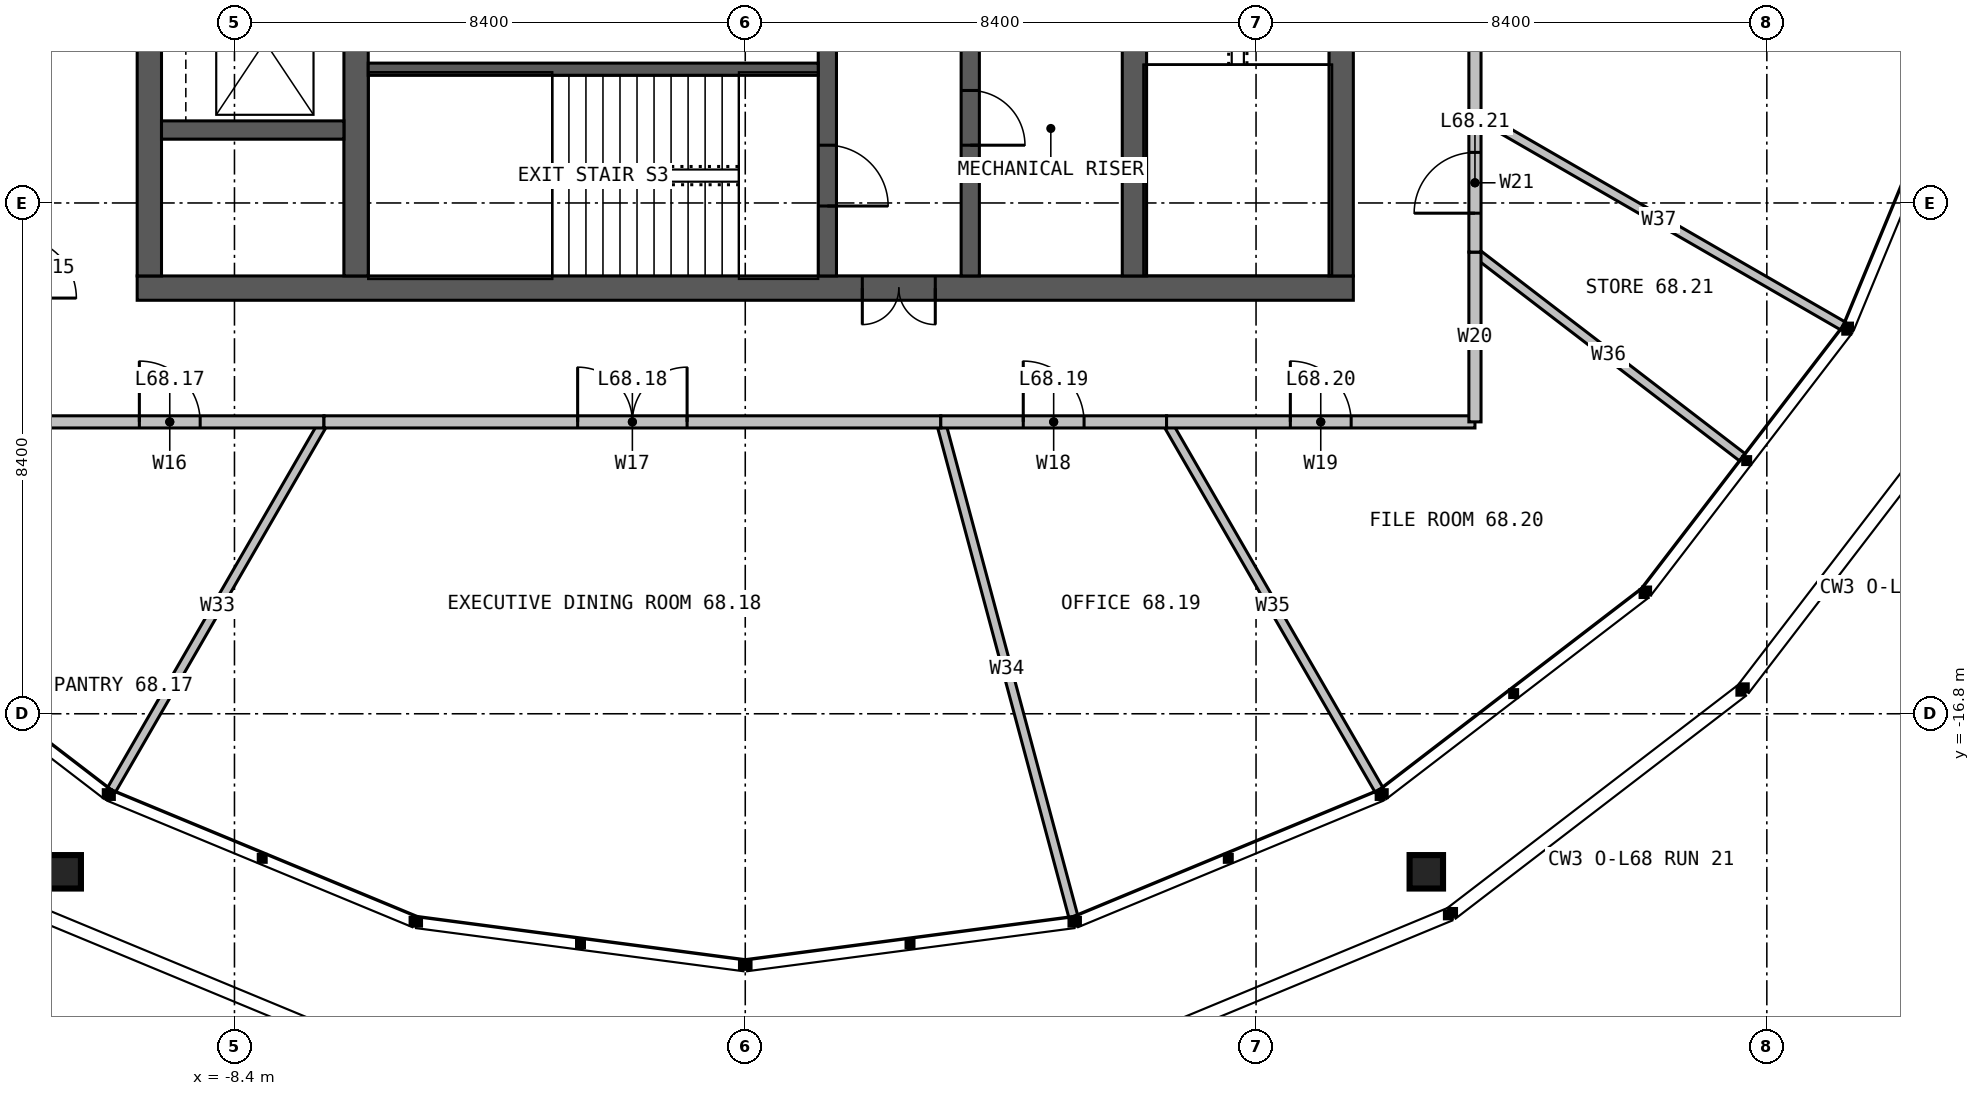
"""IFC4 building model, lengths in metres.
Left out: names, types, materials, properties, quantities, classifications, styles, units other than length and angle.
Written with IfcOpenShell. Run it as: python <this file> out.ifc"""

import sys

from ifc_helpers import new_model, si_unit, direction, frame, frame_2d, origin, origin_2d, place, context, subcontext, project, spatial, rectangle, hollow_rectangle, extrude, element, fill, save


model = new_model("IFC4")
c1 = context("Model", 3, precision=1e-05, world=origin(), true_north=direction((0.0, 1.0)))
c2 = subcontext(c1, "Body", "Model", "MODEL_VIEW")
j1 = project(units=[si_unit("LENGTHUNIT", "METRE"), si_unit("PLANEANGLEUNIT", "RADIAN")], contexts=[c1])
p1 = place(None, origin())
s1 = spatial("IfcSite", under=j1, at=p1, CompositionType="ELEMENT")
p2 = place(p1, origin())
s2 = spatial("IfcBuilding", under=s1, at=p2, CompositionType="ELEMENT")
p3 = place(p2, frame((0.0, 0.0, 280.0)))
s3 = spatial("IfcBuildingStorey", under=s2, at=p3, CompositionType="ELEMENT", Elevation=280.0)
p4 = place(p3, frame((10.0, -9.8, 0.0), z_axis=(0.0, 0.0, 1.0), x_axis=(-1.0, 0.0, 0.0)))
e1 = element("IfcWall", 1, at=p4, inside=s3, PredefinedType="SOLIDWALL", context=c2, shape_type="SweptSolid", body=[
    extrude(rectangle(XDim=20.0, YDim=0.4, at=frame_2d((10.0, 0.0))), origin(), (0.0, 0.0, 1.0), 4.0),
])
p5 = place(p4, frame((6.875, 0.0, 0.0)))
e2 = element("IfcOpeningElement", 2, at=p5, cuts=e1, PredefinedType="OPENING", context=c2, shape_type="SweptSolid", body=[
    extrude(rectangle(XDim=1.2, YDim=2.2, at=frame_2d((0.6, 1.1))), frame((0.0, 0.21, 0.0), z_axis=(0.0, -1.0, 0.0), x_axis=(1.0, 0.0, 0.0)), (0.0, 0.0, 1.0), 0.42),
])
for number, where, z_axis, x_axis in (
    (3, (9.8, -9.6, 0.0), (0.0, 0.0, 1.0), (0.0, 1.0, 0.0)),
    (4, (-9.8, 9.6, 0.0), (0.0, 0.0, 1.0), (0.0, -1.0, 0.0)),
):
    element("IfcWall", number, at=place(p3, frame(where, z_axis=z_axis, x_axis=x_axis)), inside=s3, PredefinedType="SOLIDWALL", context=c2, shape_type="SweptSolid", body=[
        extrude(rectangle(XDim=19.2, YDim=0.4, at=frame_2d((9.6, 0.0))), origin(), (0.0, 0.0, 1.0), 4.0),
    ])
p6 = place(p3, frame((-6.4, -9.6, 0.0), z_axis=(0.0, 0.0, 1.0), x_axis=(0.0, 1.0, 0.0)))
e5 = element("IfcWall", 5, at=p6, inside=s3, PredefinedType="SOLIDWALL", context=c2, shape_type="SweptSolid", body=[
    extrude(rectangle(XDim=19.2, YDim=0.4, at=frame_2d((9.6, 0.0))), origin(), (0.0, 0.0, 1.0), 4.0),
])
p7 = place(p6, frame((9.1, 0.0, 0.0)))
e6 = element("IfcOpeningElement", 6, at=p7, cuts=e5, PredefinedType="OPENING", context=c2, shape_type="SweptSolid", body=[
    extrude(rectangle(XDim=1.0, YDim=2.2, at=frame_2d((0.5, 1.1))), frame((0.0, 0.21, 0.0), z_axis=(0.0, -1.0, 0.0), x_axis=(1.0, 0.0, 0.0)), (0.0, 0.0, 1.0), 0.42),
])
p8 = place(p3, frame((6.4, 9.6, 0.0), z_axis=(0.0, 0.0, 1.0), x_axis=(0.0, -1.0, 0.0)))
e7 = element("IfcWall", 7, at=p8, inside=s3, PredefinedType="SOLIDWALL", context=c2, shape_type="SweptSolid", body=[
    extrude(rectangle(XDim=19.2, YDim=0.4, at=frame_2d((9.6, 0.0))), origin(), (0.0, 0.0, 1.0), 4.0),
])
p9 = place(p8, frame((9.1, 0.0, 0.0)))
e8 = element("IfcOpeningElement", 8, at=p9, cuts=e7, PredefinedType="OPENING", context=c2, shape_type="SweptSolid", body=[
    extrude(rectangle(XDim=1.0, YDim=2.2, at=frame_2d((0.5, 1.1))), frame((0.0, 0.21, 0.0), z_axis=(0.0, -1.0, 0.0), x_axis=(1.0, 0.0, 0.0)), (0.0, 0.0, 1.0), 0.42),
])
p10 = place(p3, frame((1.35, -1.45, 0.0), z_axis=(0.0, 0.0, 1.0), x_axis=(0.0, -1.0, 0.0)))
e9 = element("IfcWall", 9, at=p10, inside=s3, PredefinedType="SOLIDWALL", context=c2, shape_type="SweptSolid", body=[
    extrude(rectangle(XDim=8.15, YDim=0.3, at=frame_2d((4.075, 0.0))), origin(), (0.0, 0.0, 1.0), 4.0),
])
p11 = place(p10, frame((6.0, 0.0, 0.0)))
e10 = element("IfcOpeningElement", 10, at=p11, cuts=e9, PredefinedType="OPENING", context=c2, shape_type="SweptSolid", body=[
    extrude(rectangle(XDim=1.0, YDim=2.2, at=frame_2d((0.5, 1.1))), frame((0.0, 0.16, 0.0), z_axis=(0.0, -1.0, 0.0), x_axis=(1.0, 0.0, 0.0)), (0.0, 0.0, 1.0), 0.32),
])
p12 = place(p10, frame((3.525, 0.0, 0.0)))
e11 = element("IfcOpeningElement", 11, at=p12, cuts=e9, PredefinedType="OPENING", context=c2, shape_type="SweptSolid", body=[
    extrude(rectangle(XDim=0.9, YDim=2.2, at=frame_2d((0.45, 1.1))), frame((0.0, 0.16, 0.0), z_axis=(0.0, -1.0, 0.0), x_axis=(1.0, 0.0, 0.0)), (0.0, 0.0, 1.0), 0.32),
])
p13 = place(p3, frame((3.7, -1.45, 0.0), z_axis=(0.0, 0.0, 1.0), x_axis=(0.0, -1.0, 0.0)))
e12 = element("IfcWall", 12, at=p13, inside=s3, PredefinedType="SOLIDWALL", context=c2, shape_type="SweptSolid", body=[
    extrude(rectangle(XDim=8.15, YDim=0.3, at=frame_2d((4.075, 0.0))), origin(), (0.0, 0.0, 1.0), 4.0),
])
p14 = place(p13, frame((5.1, 0.0, 0.0)))
e13 = element("IfcOpeningElement", 13, at=p14, cuts=e12, PredefinedType="OPENING", context=c2, shape_type="SweptSolid", body=[
    extrude(rectangle(XDim=0.9, YDim=2.2, at=frame_2d((0.45, 1.1))), frame((0.0, 0.16, 0.0), z_axis=(0.0, -1.0, 0.0), x_axis=(1.0, 0.0, 0.0)), (0.0, 0.0, 1.0), 0.32),
])
p15 = place(p3, frame((-6.2, -6.2, 0.0), z_axis=(0.0, 0.0, 1.0), x_axis=(1.0, 0.0, 0.0)))
e14 = element("IfcWall", 14, at=p15, inside=s3, PredefinedType="SOLIDWALL", context=c2, shape_type="SweptSolid", body=[
    extrude(rectangle(XDim=7.4, YDim=0.2, at=frame_2d((3.7, 0.0))), origin(), (0.0, 0.0, 1.0), 4.0),
])
p16 = place(p3, frame((-9.6, -7.2, 0.0), z_axis=(0.0, 0.0, 1.0), x_axis=(1.0, 0.0, 0.0)))
e15 = element("IfcWall", 15, at=p16, inside=s3, PredefinedType="SOLIDWALL", context=c2, shape_type="SweptSolid", body=[
    extrude(rectangle(XDim=3.0, YDim=0.3, at=frame_2d((1.5, 0.0))), origin(), (0.0, 0.0, 1.0), 4.0),
])
for number, where, z_axis, x_axis in (
    (16, (-11.2, -19.399, -0.71), (0.0, 0.0, 1.0), (1.0, 0.0, 0.0)),
    (17, (11.2, -19.399, -0.71), (0.0, 0.0, 1.0), (1.0, 0.0, 0.0)),
):
    element("IfcColumn", number, at=place(p3, frame(where, z_axis=z_axis, x_axis=x_axis)), inside=s3, PredefinedType="COLUMN", context=c2, shape_type="SweptSolid", body=[
        extrude(hollow_rectangle(XDim=0.55, YDim=0.55, WallThickness=0.04, at=origin_2d()), origin(), (0.0, 0.0, 1.0), 4.0),
    ])
p17 = place(p3, frame((12.0, -6.928, 0.0), z_axis=(0.0, 0.0, 1.0), x_axis=(0.866031452229, -0.49998952364, 0.0)))
e18 = element("IfcWall", 18, at=p17, inside=s3, PredefinedType="PARTITIONING", context=c2, shape_type="SweptSolid", body=[
    extrude(rectangle(XDim=6.99, YDim=0.15, at=frame_2d((3.495, 0.0))), origin(), (0.0, 0.0, 1.0), 2.7),
])
p18 = place(p3, frame((-6.928, -12.0, 0.0), z_axis=(0.0, 0.0, 1.0), x_axis=(-0.49998952364, -0.866031452229, 0.0)))
e19 = element("IfcWall", 19, at=p18, inside=s3, PredefinedType="PARTITIONING", context=c2, shape_type="SweptSolid", body=[
    extrude(rectangle(XDim=6.99, YDim=0.15, at=frame_2d((3.495, 0.0))), origin(), (0.0, 0.0, 1.0), 2.79),
])
p19 = place(p3, frame((3.215, -12.0, 0.0), z_axis=(0.0, 0.0, 1.0), x_axis=(0.258835086115, -0.96592152797, 0.0)))
e20 = element("IfcWall", 20, at=p19, inside=s3, PredefinedType="PARTITIONING", context=c2, shape_type="SweptSolid", body=[
    extrude(rectangle(XDim=8.423, YDim=0.15, at=frame_2d((4.211, 0.0))), origin(), (0.0, 0.0, 1.0), 2.7),
])
p20 = place(p3, frame((6.928, -12.0, 0.0), z_axis=(0.0, 0.0, 1.0), x_axis=(0.49998952364, -0.866031452229, 0.0)))
e21 = element("IfcWall", 21, at=p20, inside=s3, PredefinedType="PARTITIONING", context=c2, shape_type="SweptSolid", body=[
    extrude(rectangle(XDim=6.99, YDim=0.15, at=frame_2d((3.495, 0.0))), origin(), (0.0, 0.0, 1.0), 2.79),
])
p21 = place(p3, frame((12.0, -9.208, 0.0), z_axis=(0.0, 0.0, 1.0), x_axis=(0.793365234103, -0.608745928377, 0.0)))
e22 = element("IfcWall", 22, at=p21, inside=s3, PredefinedType="PARTITIONING", context=c2, shape_type="SweptSolid", body=[
    extrude(rectangle(XDim=5.542, YDim=0.15, at=frame_2d((2.771, 0.0))), origin(), (0.0, 0.0, 1.0), 2.79),
])
p22 = place(p3, frame((12.0, -6.928, 0.0), z_axis=(0.0, 0.0, 1.0), x_axis=(0.0, 1.0, 0.0)))
e23 = element("IfcWall", 23, at=p22, inside=s3, PredefinedType="PARTITIONING", context=c2, shape_type="SweptSolid", body=[
    extrude(rectangle(XDim=8.508, YDim=0.2, at=frame_2d((4.254, 0.0))), origin(), (0.0, 0.0, 1.0), 3.7),
])
p23 = place(p22, frame((3.754, 0.0, 0.0)))
e24 = element("IfcOpeningElement", 24, at=p23, cuts=e23, PredefinedType="OPENING", context=c2, shape_type="SweptSolid", body=[
    extrude(rectangle(XDim=1.0, YDim=2.2, at=frame_2d((0.5, 1.1))), frame((0.0, 0.11, 0.0), z_axis=(0.0, -1.0, 0.0), x_axis=(1.0, 0.0, 0.0)), (0.0, 0.0, 1.0), 0.22),
])
p24 = place(p3, frame((-12.0, -12.0, 0.0), z_axis=(0.0, 0.0, 1.0), x_axis=(1.0, 0.0, 0.0)))
e25 = element("IfcWall", 25, at=p24, inside=s3, PredefinedType="PARTITIONING", context=c2, shape_type="SweptSolid", body=[
    extrude(rectangle(XDim=5.072, YDim=0.2, at=frame_2d((2.536, 0.0))), origin(), (0.0, 0.0, 1.0), 3.7),
])
p25 = place(p24, frame((2.036, 0.0, 0.0)))
e26 = element("IfcOpeningElement", 26, at=p25, cuts=e25, PredefinedType="OPENING", context=c2, shape_type="SweptSolid", body=[
    extrude(rectangle(XDim=1.0, YDim=2.2, at=frame_2d((0.5, 1.1))), frame((0.0, 0.11, 0.0), z_axis=(0.0, -1.0, 0.0), x_axis=(1.0, 0.0, 0.0)), (0.0, 0.0, 1.0), 0.22),
])
p26 = place(p3, frame((-6.928, -12.0, 0.0), z_axis=(0.0, 0.0, 1.0), x_axis=(1.0, 0.0, 0.0)))
e27 = element("IfcWall", 27, at=p26, inside=s3, PredefinedType="PARTITIONING", context=c2, shape_type="SweptSolid", body=[
    extrude(rectangle(XDim=10.144, YDim=0.2, at=frame_2d((5.072, 0.0))), origin(), (0.0, 0.0, 1.0), 3.7),
])
p27 = place(p26, frame((4.172, 0.0, 0.0)))
e28 = element("IfcOpeningElement", 28, at=p27, cuts=e27, PredefinedType="OPENING", context=c2, shape_type="SweptSolid", body=[
    extrude(rectangle(XDim=1.8, YDim=2.2, at=frame_2d((0.9, 1.1))), frame((0.0, 0.11, 0.0), z_axis=(0.0, -1.0, 0.0), x_axis=(1.0, 0.0, 0.0)), (0.0, 0.0, 1.0), 0.22),
])
p28 = place(p3, frame((3.215, -12.0, 0.0), z_axis=(0.0, 0.0, 1.0), x_axis=(1.0, 0.0, 0.0)))
e29 = element("IfcWall", 29, at=p28, inside=s3, PredefinedType="PARTITIONING", context=c2, shape_type="SweptSolid", body=[
    extrude(rectangle(XDim=3.713, YDim=0.2, at=frame_2d((1.856, 0.0))), origin(), (0.0, 0.0, 1.0), 3.7),
])
p29 = place(p28, frame((1.356, 0.0, 0.0)))
e30 = element("IfcOpeningElement", 30, at=p29, cuts=e29, PredefinedType="OPENING", context=c2, shape_type="SweptSolid", body=[
    extrude(rectangle(XDim=1.0, YDim=2.2, at=frame_2d((0.5, 1.1))), frame((0.0, 0.11, 0.0), z_axis=(0.0, -1.0, 0.0), x_axis=(1.0, 0.0, 0.0)), (0.0, 0.0, 1.0), 0.22),
])
p30 = place(p3, frame((6.928, -12.0, 0.0), z_axis=(0.0, 0.0, 1.0), x_axis=(1.0, 0.0, 0.0)))
e31 = element("IfcWall", 31, at=p30, inside=s3, PredefinedType="PARTITIONING", context=c2, shape_type="SweptSolid", body=[
    extrude(rectangle(XDim=5.072, YDim=0.2, at=frame_2d((2.536, 0.0))), origin(), (0.0, 0.0, 1.0), 3.7),
])
p31 = place(p30, frame((2.036, 0.0, 0.0)))
e32 = element("IfcOpeningElement", 32, at=p31, cuts=e31, PredefinedType="OPENING", context=c2, shape_type="SweptSolid", body=[
    extrude(rectangle(XDim=1.0, YDim=2.2, at=frame_2d((0.5, 1.1))), frame((0.0, 0.11, 0.0), z_axis=(0.0, -1.0, 0.0), x_axis=(1.0, 0.0, 0.0)), (0.0, 0.0, 1.0), 0.22),
])
p32 = place(p3, frame((12.0, -12.0, 0.0), z_axis=(0.0, 0.0, 1.0), x_axis=(0.0, 1.0, 0.0)))
e33 = element("IfcWall", 33, at=p32, inside=s3, PredefinedType="PARTITIONING", context=c2, shape_type="SweptSolid", body=[
    extrude(rectangle(XDim=2.792, YDim=0.2, at=frame_2d((1.396, 0.0))), origin(), (0.0, 0.0, 1.0), 3.7),
])
p33 = place(p3, frame((12.0, -9.208, 0.0), z_axis=(0.0, 0.0, 1.0), x_axis=(0.0, 1.0, 0.0)))
e34 = element("IfcWall", 34, at=p33, inside=s3, PredefinedType="PARTITIONING", context=c2, shape_type="SweptSolid", body=[
    extrude(rectangle(XDim=2.28, YDim=0.2, at=frame_2d((1.14, 0.0))), origin(), (0.0, 0.0, 1.0), 3.7),
])
p34 = place(p33, frame((0.64, 0.0, 0.0)))
e35 = element("IfcOpeningElement", 35, at=p34, cuts=e34, PredefinedType="OPENING", context=c2, shape_type="SweptSolid", body=[
    extrude(rectangle(XDim=1.0, YDim=2.2, at=frame_2d((0.5, 1.1))), frame((0.0, 0.11, 0.0), z_axis=(0.0, -1.0, 0.0), x_axis=(1.0, 0.0, 0.0)), (0.0, 0.0, 1.0), 0.22),
])
p35 = place(p5, origin())
e36 = element("IfcDoor", 36, at=p35, inside=s3, OperationType="DOUBLE_DOOR_SINGLE_SWING", PredefinedType="DOOR", context=c2, shape_type="SweptSolid", body=[
    extrude(rectangle(XDim=1.2, YDim=2.2, at=frame_2d((0.6, 1.1))), frame((0.0, 0.025, 0.0), z_axis=(0.0, -1.0, 0.0), x_axis=(1.0, 0.0, 0.0)), (0.0, 0.0, 1.0), 0.05),
])
fill(e2, e36)
p36 = place(p11, origin())
e37 = element("IfcDoor", 37, at=p36, inside=s3, OperationType="SINGLE_SWING_RIGHT", PredefinedType="DOOR", context=c2, shape_type="SweptSolid", body=[
    extrude(rectangle(XDim=1.0, YDim=2.2, at=frame_2d((0.5, 1.1))), frame((0.0, 0.025, 0.0), z_axis=(0.0, -1.0, 0.0), x_axis=(1.0, 0.0, 0.0)), (0.0, 0.0, 1.0), 0.05),
])
fill(e10, e37)
p37 = place(p14, origin())
e38 = element("IfcDoor", 38, at=p37, inside=s3, OperationType="SINGLE_SWING_RIGHT", PredefinedType="DOOR", context=c2, shape_type="SweptSolid", body=[
    extrude(rectangle(XDim=0.9, YDim=2.2, at=frame_2d((0.45, 1.1))), frame((0.0, 0.025, 0.0), z_axis=(0.0, -1.0, 0.0), x_axis=(1.0, 0.0, 0.0)), (0.0, 0.0, 1.0), 0.05),
])
fill(e13, e38)
p38 = place(p25, origin())
e39 = element("IfcDoor", 39, at=p38, inside=s3, OperationType="SINGLE_SWING_LEFT", PredefinedType="DOOR", context=c2, shape_type="SweptSolid", body=[
    extrude(rectangle(XDim=1.0, YDim=2.2, at=frame_2d((0.5, 1.1))), frame((0.0, 0.025, 0.0), z_axis=(0.0, -1.0, 0.0), x_axis=(1.0, 0.0, 0.0)), (0.0, 0.0, 1.0), 0.05),
])
fill(e26, e39)
p39 = place(p27, origin())
e40 = element("IfcDoor", 40, at=p39, inside=s3, OperationType="DOUBLE_DOOR_SINGLE_SWING", PredefinedType="DOOR", context=c2, shape_type="SweptSolid", body=[
    extrude(rectangle(XDim=1.8, YDim=2.2, at=frame_2d((0.9, 1.1))), frame((0.0, 0.025, 0.0), z_axis=(0.0, -1.0, 0.0), x_axis=(1.0, 0.0, 0.0)), (0.0, 0.0, 1.0), 0.05),
])
fill(e28, e40)
p40 = place(p29, origin())
e41 = element("IfcDoor", 41, at=p40, inside=s3, OperationType="SINGLE_SWING_LEFT", PredefinedType="DOOR", context=c2, shape_type="SweptSolid", body=[
    extrude(rectangle(XDim=1.0, YDim=2.2, at=frame_2d((0.5, 1.1))), frame((0.0, 0.025, 0.0), z_axis=(0.0, -1.0, 0.0), x_axis=(1.0, 0.0, 0.0)), (0.0, 0.0, 1.0), 0.05),
])
fill(e30, e41)
p41 = place(p31, origin())
e42 = element("IfcDoor", 42, at=p41, inside=s3, OperationType="SINGLE_SWING_LEFT", PredefinedType="DOOR", context=c2, shape_type="SweptSolid", body=[
    extrude(rectangle(XDim=1.0, YDim=2.2, at=frame_2d((0.5, 1.1))), frame((0.0, 0.025, 0.0), z_axis=(0.0, -1.0, 0.0), x_axis=(1.0, 0.0, 0.0)), (0.0, 0.0, 1.0), 0.05),
])
fill(e32, e42)
p42 = place(p34, origin())
e43 = element("IfcDoor", 43, at=p42, inside=s3, OperationType="SINGLE_SWING_LEFT", PredefinedType="DOOR", context=c2, shape_type="SweptSolid", body=[
    extrude(rectangle(XDim=1.0, YDim=2.2, at=frame_2d((0.5, 1.1))), frame((0.0, 0.025, 0.0), z_axis=(0.0, -1.0, 0.0), x_axis=(1.0, 0.0, 0.0)), (0.0, 0.0, 1.0), 0.05),
])
fill(e35, e43)
save(model, sys.argv[1])
